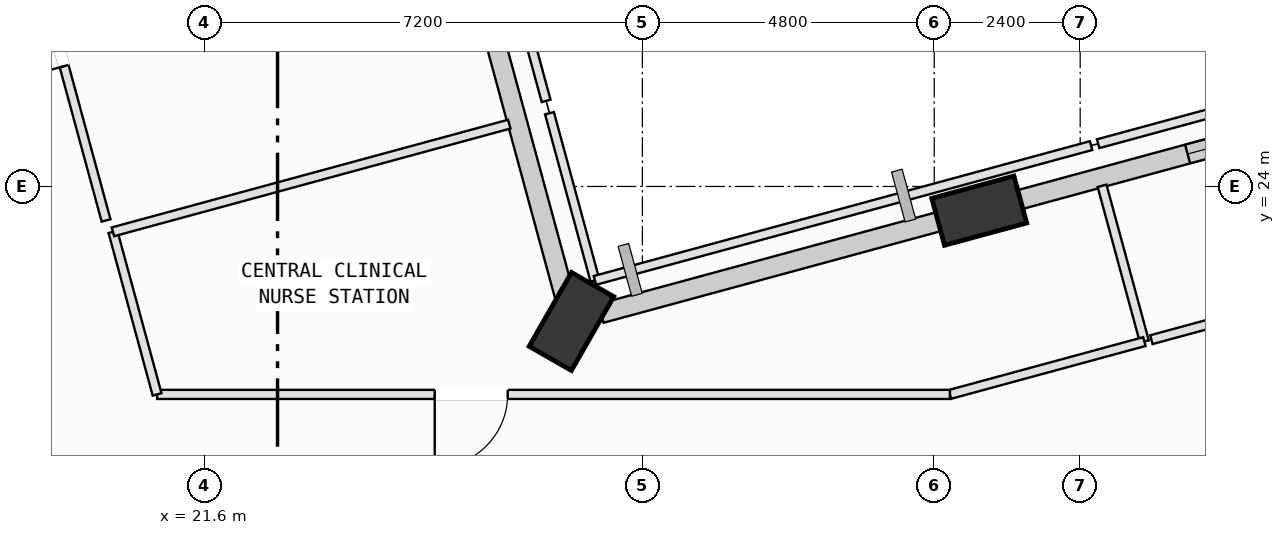
"""IFC4 building model, lengths in metres.
Left out: names, types, materials, properties, quantities, classifications, styles, units other than length and angle.
Written with IfcOpenShell. Run it as: python <this file> out.ifc"""

import sys

from ifc_helpers import new_model, si_unit, direction, frame, frame_2d, origin, origin_2d, place, context, subcontext, project, spatial, rectangle, extrude, element, fill, save


model = new_model("IFC4")
c1 = context("Model", 3, precision=1e-05, world=origin(), true_north=direction((0.0, 1.0)))
c2 = subcontext(c1, "Body", "Model", "MODEL_VIEW")
j1 = project(units=[si_unit("LENGTHUNIT", "METRE"), si_unit("PLANEANGLEUNIT", "RADIAN")], contexts=[c1])
p1 = place(None, origin())
s1 = spatial("IfcSite", under=j1, at=p1, CompositionType="ELEMENT")
p2 = place(p1, origin())
s2 = spatial("IfcBuilding", under=s1, at=p2, CompositionType="ELEMENT")
p3 = place(p2, frame((0.0, 0.0, 88.4)))
s3 = spatial("IfcBuildingStorey", under=s2, at=p3, CompositionType="ELEMENT", Elevation=88.4)
p4 = place(p3, frame((34.34, 23.602, 0.006), z_axis=(0.004891986406, 0.003118641334, 0.999983171131), x_axis=(-0.739833024485, 0.67278880948, 0.001521091706)))
e1 = element("IfcColumn", 1, at=p4, inside=s3, PredefinedType="COLUMN", context=c2, shape_type="SweptSolid", body=[
    extrude(rectangle(XDim=1.4, YDim=0.8, at=origin_2d()), origin(), (0.0, 0.0, 1.0), 3.992),
])
p5 = place(p3, frame((27.633, 21.779, 0.025), z_axis=(0.012775417682, -0.024629531204, 0.99961501334), x_axis=(0.041751933516, 0.998837867097, 0.024076779265)))
e2 = element("IfcColumn", 2, at=p5, inside=s3, PredefinedType="COLUMN", context=c2, shape_type="SweptSolid", body=[
    extrude(rectangle(XDim=1.4, YDim=0.8, at=origin_2d()), origin(), (0.0, 0.0, 1.0), 3.975),
])
p6 = place(p3, frame((34.83, 23.735, 0.0), z_axis=(0.0, 0.0, 1.0), x_axis=(0.965020065413, 0.262176035042, 0.0)))
e3 = element("IfcWall", 3, at=p6, inside=s3, PredefinedType="SOLIDWALL", context=c2, shape_type="SweptSolid", body=[
    extrude(rectangle(XDim=6.211, YDim=0.32, at=frame_2d((3.105, 0.0))), origin(), (0.0, 0.0, 1.0), 3.165),
])
p7 = place(p6, frame((3.044, 0.0, 0.75)))
e4 = element("IfcOpeningElement", 4, at=p7, cuts=e3, PredefinedType="OPENING", context=c2, shape_type="SweptSolid", body=[
    extrude(rectangle(XDim=2.0, YDim=1.95, at=frame_2d((1.0, 0.975))), frame((0.0, 0.17, 0.0), z_axis=(0.0, -1.0, 0.0), x_axis=(1.0, 0.0, 0.0)), (0.0, 0.0, 1.0), 0.34),
])
p8 = place(p3, frame((28.12, 21.912, 0.0), z_axis=(0.0, 0.0, 1.0), x_axis=(0.965022370274, 0.26216755114, 0.0)))
e5 = element("IfcWall", 5, at=p8, inside=s3, PredefinedType="SOLIDWALL", context=c2, shape_type="SweptSolid", body=[
    extrude(rectangle(XDim=5.96, YDim=0.32, at=frame_2d((2.98, 0.0))), origin(), (0.0, 0.0, 1.0), 3.165),
])
p9 = place(p3, frame((25.745, 28.73, 0.0), z_axis=(0.0, 0.0, 1.0), x_axis=(0.262166868699, -0.965022555673, 0.0)))
e6 = element("IfcWall", 6, at=p9, inside=s3, PredefinedType="SOLIDWALL", context=c2, shape_type="SweptSolid", body=[
    extrude(rectangle(XDim=6.76, YDim=0.32, at=frame_2d((3.38, 0.0))), origin(), (0.0, 0.0, 1.0), 2.765),
])
p10 = place(p3, frame((38.03, 18.802, 0.0), z_axis=(0.0, 0.0, 1.0), x_axis=(0.965032576147, 0.26212998107, 0.0)))
e7 = element("IfcWall", 7, at=p10, inside=s3, PredefinedType="PARTITIONING", context=c2, shape_type="SweptSolid", body=[
    extrude(rectangle(XDim=6.738, YDim=0.15, at=frame_2d((3.369, 0.0))), origin(), (0.0, 0.0, 1.0), 2.765),
])
p11 = place(p10, frame((2.769, 0.0, 0.0)))
e8 = element("IfcOpeningElement", 8, at=p11, cuts=e7, PredefinedType="OPENING", context=c2, shape_type="SweptSolid", body=[
    extrude(rectangle(XDim=1.2, YDim=2.15, at=frame_2d((0.6, 1.075))), frame((0.0, 0.085, 0.0), z_axis=(0.0, -1.0, 0.0), x_axis=(1.0, 0.0, 0.0)), (0.0, 0.0, 1.0), 0.17),
])
p12 = place(p3, frame((36.36, 24.011, 0.0), z_axis=(0.0, 0.0, 1.0), x_axis=(0.262090118072, -0.965043403174, 0.0)))
e9 = element("IfcWall", 9, at=p12, inside=s3, PredefinedType="PARTITIONING", context=c2, shape_type="SweptSolid", body=[
    extrude(rectangle(XDim=2.655, YDim=0.15, at=frame_2d((1.327, 0.0))), origin(), (0.0, 0.0, 1.0), 3.78),
])
p13 = place(p3, frame((37.056, 21.449, 0.0), z_axis=(0.0, 0.0, 1.0), x_axis=(-0.965014994537, -0.262194699256, 0.0)))
e10 = element("IfcWall", 10, at=p13, inside=s3, PredefinedType="PARTITIONING", context=c2, shape_type="SweptSolid", body=[
    extrude(rectangle(XDim=3.314, YDim=0.15, at=frame_2d((1.657, 0.0))), origin(), (0.0, 0.0, 1.0), 3.78),
])
p14 = place(p3, frame((33.858, 20.58, 0.0), z_axis=(0.0, 0.0, 1.0), x_axis=(-1.0, 0.0, 0.0)))
e11 = element("IfcWall", 11, at=p14, inside=s3, PredefinedType="PARTITIONING", context=c2, shape_type="SweptSolid", body=[
    extrude(rectangle(XDim=13.039, YDim=0.15, at=frame_2d((6.52, 0.0))), origin(), (0.0, 0.0, 1.0), 3.78),
])
p15 = place(p14, frame((7.273, 0.0, 0.0)))
e12 = element("IfcOpeningElement", 12, at=p15, cuts=e11, PredefinedType="OPENING", context=c2, shape_type="SweptSolid", body=[
    extrude(rectangle(XDim=1.2, YDim=2.15, at=frame_2d((0.6, 1.075))), frame((0.0, 0.085, 0.0), z_axis=(0.0, -1.0, 0.0), x_axis=(1.0, 0.0, 0.0)), (0.0, 0.0, 1.0), 0.17),
])
p16 = place(p3, frame((20.819, 20.58, 0.0), z_axis=(0.0, 0.0, 1.0), x_axis=(-0.262058493621, 0.965051991305, 0.0)))
e13 = element("IfcWall", 13, at=p16, inside=s3, PredefinedType="PARTITIONING", context=c2, shape_type="SweptSolid", body=[
    extrude(rectangle(XDim=2.771, YDim=0.15, at=frame_2d((1.385, 0.0))), origin(), (0.0, 0.0, 1.0), 3.78),
])
p17 = place(p3, frame((20.093, 23.254, 0.0), z_axis=(0.0, 0.0, 1.0), x_axis=(0.965013623276, 0.26219974617, 0.0)))
e14 = element("IfcWall", 14, at=p17, inside=s3, PredefinedType="PARTITIONING", context=c2, shape_type="SweptSolid", body=[
    extrude(rectangle(XDim=6.754, YDim=0.15, at=frame_2d((3.377, 0.0))), origin(), (0.0, 0.0, 1.0), 3.78),
])
p18 = place(p3, frame((27.272, 25.205, 0.0), z_axis=(0.0, 0.0, 1.0), x_axis=(0.262479468872, -0.964937577474, 0.0)))
e15 = element("IfcWall", 15, at=p18, inside=s3, PredefinedType="PARTITIONING", context=c2, shape_type="SweptSolid", body=[
    extrude(rectangle(XDim=2.85, YDim=0.15, at=frame_2d((1.425, 0.0))), origin(), (0.0, 0.0, 1.0), 3.78),
])
p19 = place(p3, frame((28.02, 22.455, 0.0), z_axis=(0.0, 0.0, 1.0), x_axis=(0.965015238814, 0.262193800188, 0.0)))
e16 = element("IfcWall", 16, at=p19, inside=s3, PredefinedType="PARTITIONING", context=c2, shape_type="SweptSolid", body=[
    extrude(rectangle(XDim=8.456, YDim=0.15, at=frame_2d((4.228, 0.0))), origin(), (0.0, 0.0, 1.0), 3.78),
])
p20 = place(p3, frame((48.999, 24.694, 0.0), z_axis=(0.0, 0.0, 1.0), x_axis=(-0.965006566945, -0.262225715279, 0.0)))
e17 = element("IfcWall", 17, at=p20, inside=s3, PredefinedType="PARTITIONING", context=c2, shape_type="SweptSolid", body=[
    extrude(rectangle(XDim=12.257, YDim=0.15, at=frame_2d((6.128, 0.0))), origin(), (0.0, 0.0, 1.0), 2.765),
])
p21 = place(p20, frame((5.528, 0.0, 0.0)))
e18 = element("IfcOpeningElement", 18, at=p21, cuts=e17, PredefinedType="OPENING", context=c2, shape_type="SweptSolid", body=[
    extrude(rectangle(XDim=1.2, YDim=2.15, at=frame_2d((0.6, 1.075))), frame((0.0, 0.085, 0.0), z_axis=(0.0, -1.0, 0.0), x_axis=(1.0, 0.0, 0.0)), (0.0, 0.0, 1.0), 0.17),
])
p22 = place(p3, frame((36.296, 24.703, 0.0), z_axis=(0.0, 0.0, 1.0), x_axis=(0.965001087771, 0.262245878138, 0.0)))
e19 = element("IfcWall", 19, at=p22, inside=s3, PredefinedType="PARTITIONING", context=c2, shape_type="SweptSolid", body=[
    extrude(rectangle(XDim=12.256, YDim=0.15, at=frame_2d((6.128, 0.0))), origin(), (0.0, 0.0, 1.0), 3.165),
])
p23 = place(p3, frame((19.98, 23.441, 0.0), z_axis=(0.0, 0.0, 1.0), x_axis=(-0.262234720493, 0.965004119871, 0.0)))
e20 = element("IfcWall", 20, at=p23, inside=s3, PredefinedType="PARTITIONING", context=c2, shape_type="SweptSolid", body=[
    extrude(rectangle(XDim=6.46, YDim=0.15, at=frame_2d((3.23, 0.0))), origin(), (0.0, 0.0, 1.0), 3.78),
])
p24 = place(p23, frame((2.63, 0.0, 0.0)))
e21 = element("IfcOpeningElement", 21, at=p24, cuts=e20, PredefinedType="OPENING", context=c2, shape_type="SweptSolid", body=[
    extrude(rectangle(XDim=1.2, YDim=2.15, at=frame_2d((0.6, 1.075))), frame((0.0, 0.085, 0.0), z_axis=(0.0, -1.0, 0.0), x_axis=(1.0, 0.0, 0.0)), (0.0, 0.0, 1.0), 0.17),
])
p25 = place(p3, frame((25.524, 31.642, 0.0), z_axis=(0.0, 0.0, 1.0), x_axis=(0.262093941631, -0.965042364749, 0.0)))
e22 = element("IfcWall", 22, at=p25, inside=s3, PredefinedType="PARTITIONING", context=c2, shape_type="SweptSolid", body=[
    extrude(rectangle(XDim=6.46, YDim=0.15, at=frame_2d((3.23, 0.0))), origin(), (0.0, 0.0, 1.0), 3.78),
])
p26 = place(p7, origin())
e23 = element("IfcWindow", 23, at=p26, inside=s3, PartitioningType="SINGLE_PANEL", PredefinedType="WINDOW", context=c2, shape_type="SweptSolid", body=[
    extrude(rectangle(XDim=2.0, YDim=1.95, at=frame_2d((1.0, 0.975))), frame((0.0, 0.03, 0.0), z_axis=(0.0, -1.0, 0.0), x_axis=(1.0, 0.0, 0.0)), (0.0, 0.0, 1.0), 0.06),
])
fill(e4, e23)
p27 = place(p15, origin())
e24 = element("IfcDoor", 24, at=p27, inside=s3, OperationType="SINGLE_SWING_RIGHT", PredefinedType="DOOR", context=c2, shape_type="SweptSolid", body=[
    extrude(rectangle(XDim=1.2, YDim=2.15, at=frame_2d((0.6, 1.075))), frame((0.0, 0.025, 0.0), z_axis=(0.0, -1.0, 0.0), x_axis=(1.0, 0.0, 0.0)), (0.0, 0.0, 1.0), 0.05),
])
fill(e12, e24)
p28 = place(p24, origin())
e25 = element("IfcDoor", 25, at=p28, inside=s3, OperationType="SINGLE_SWING_LEFT", PredefinedType="DOOR", context=c2, shape_type="SweptSolid", body=[
    extrude(rectangle(XDim=1.2, YDim=2.15, at=frame_2d((0.6, 1.075))), frame((0.0, 0.025, 0.0), z_axis=(0.0, -1.0, 0.0), x_axis=(1.0, 0.0, 0.0)), (0.0, 0.0, 1.0), 0.05),
])
fill(e21, e25)
save(model, sys.argv[1])
